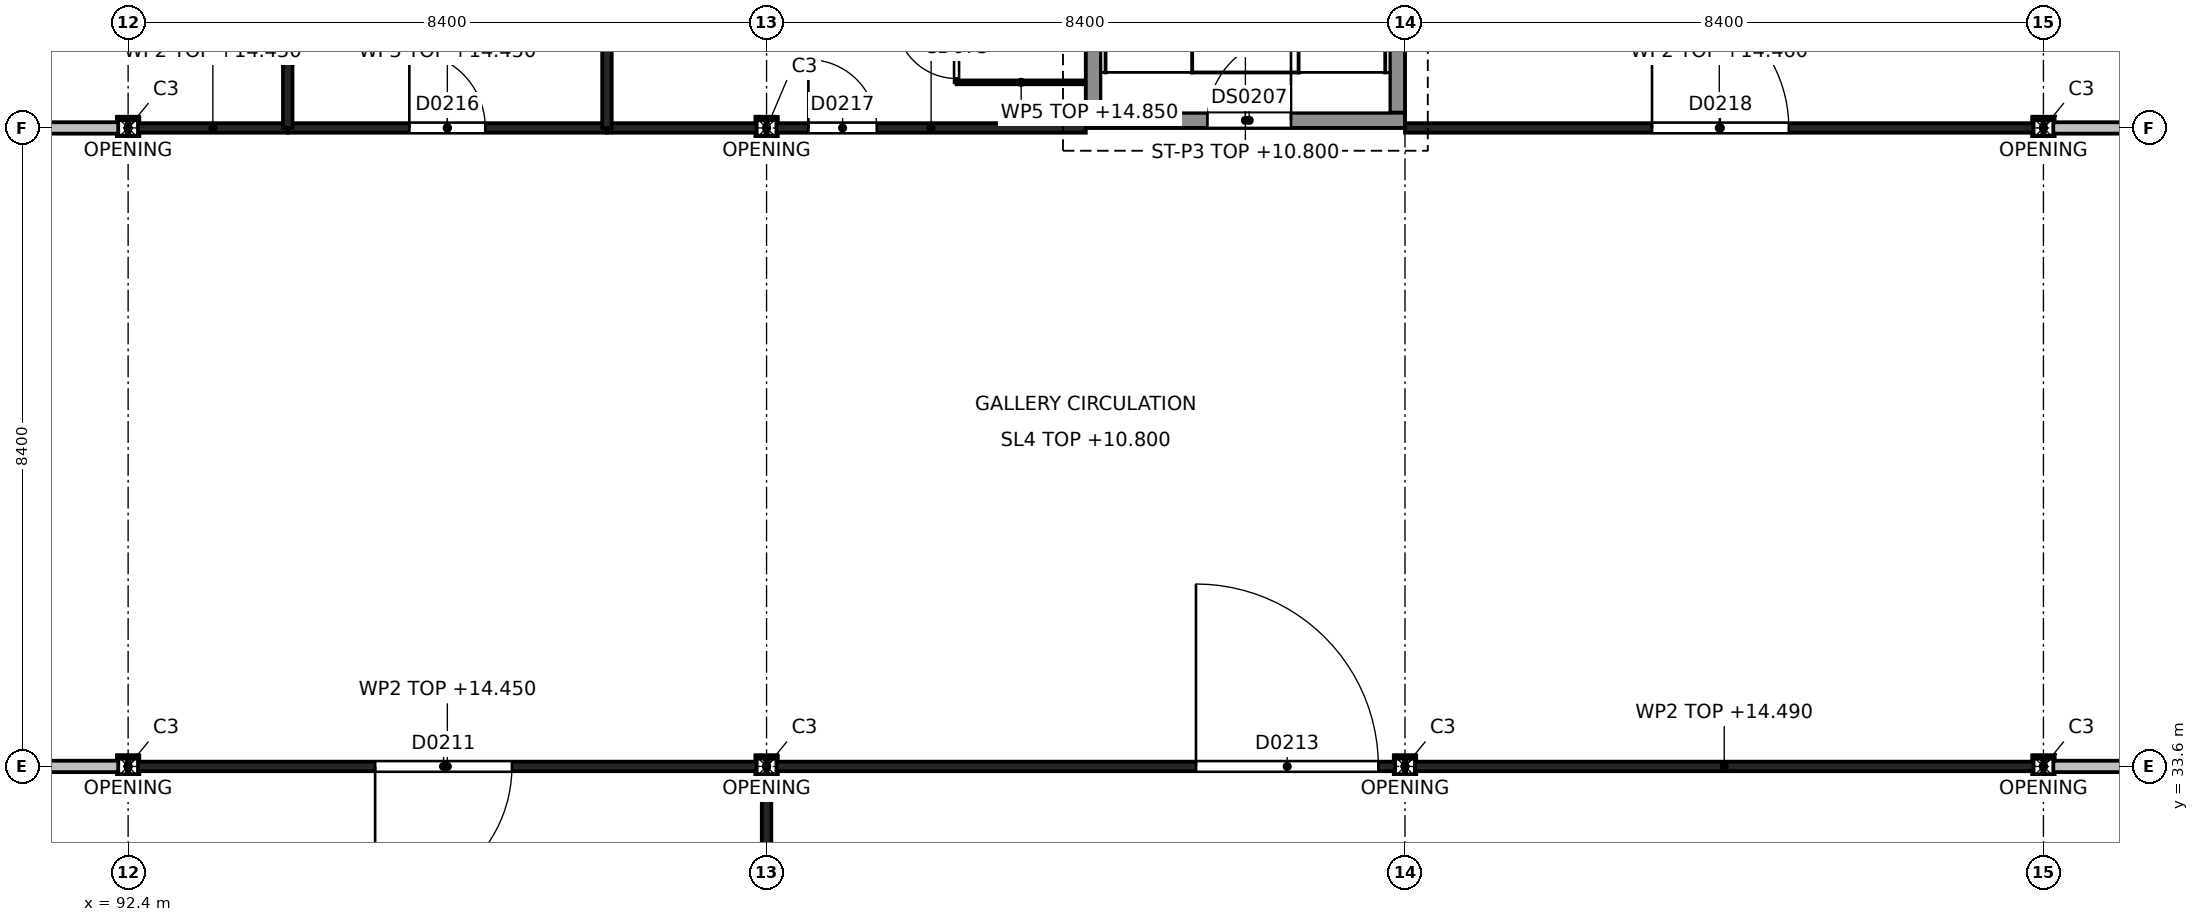
"""IFC4 building model, lengths in metres.
Left out: names, types, materials, properties, quantities, classifications, styles, units other than length and angle.
Written with IfcOpenShell. Run it as: python <this file> out.ifc"""

import sys

from ifc_helpers import new_model, si_unit, direction, frame, frame_2d, origin, origin_2d, place, context, subcontext, project, spatial, rectangle, i_section, extrude, element, fill, save


model = new_model("IFC4")
c1 = context("Model", 3, precision=1e-05, world=origin(), true_north=direction((0.0, 1.0)))
c2 = subcontext(c1, "Body", "Model", "MODEL_VIEW")
j1 = project(units=[si_unit("LENGTHUNIT", "METRE"), si_unit("PLANEANGLEUNIT", "RADIAN")], contexts=[c1])
p1 = place(None, origin())
s1 = spatial("IfcSite", under=j1, at=p1, CompositionType="ELEMENT")
p2 = place(p1, origin())
s2 = spatial("IfcBuilding", under=s1, at=p2, CompositionType="ELEMENT")
p3 = place(p2, frame((0.0, 0.0, 10.8)))
s3 = spatial("IfcBuildingStorey", under=s2, at=p3, CompositionType="ELEMENT", Elevation=10.8)
for number, where, z_axis, x_axis in (
    (1, (92.4, 33.6, 0.0), (0.0, 0.0, 1.0), (1.0, 0.0, 0.0)),
    (2, (92.4, 42.0, 0.0), (0.0, 0.0, 1.0), (1.0, 0.0, 0.0)),
    (3, (100.8, 33.6, 0.0), (0.0, 0.0, 1.0), (1.0, 0.0, 0.0)),
    (4, (100.8, 42.0, 0.0), (0.0, 0.0, 1.0), (1.0, 0.0, 0.0)),
    (5, (109.2, 33.6, 0.0), (0.0, 0.0, 1.0), (1.0, 0.0, 0.0)),
    (6, (117.6, 33.6, 0.0), (0.0, 0.0, 1.0), (1.0, 0.0, 0.0)),
    (7, (117.6, 42.0, 0.0), (0.0, 0.0, 1.0), (1.0, 0.0, 0.0)),
):
    element("IfcColumn", number, at=place(p3, frame(where, z_axis=z_axis, x_axis=x_axis)), inside=s3, PredefinedType="COLUMN", context=c2, shape_type="SweptSolid", body=[
        extrude(i_section(OverallWidth=0.26, OverallDepth=0.26, WebThickness=0.01, FlangeThickness=0.018, at=origin_2d()), origin(), (0.0, 0.0, 1.0), 4.2),
    ])
p4 = place(p3, frame((105.0, 42.1, 0.0), z_axis=(0.0, 0.0, 1.0), x_axis=(1.0, 0.0, 0.0)))
e8 = element("IfcWall", 8, at=p4, inside=s3, PredefinedType="SHEAR", context=c2, shape_type="SweptSolid", body=[
    extrude(rectangle(XDim=4.2, YDim=0.2, at=frame_2d((2.1, 0.0))), origin(), (0.0, 0.0, 1.0), 4.2),
])
p5 = place(p4, frame((1.6, 0.0, 0.0)))
e9 = element("IfcOpeningElement", 9, at=p5, cuts=e8, PredefinedType="OPENING", context=c2, shape_type="SweptSolid", body=[
    extrude(rectangle(XDim=1.1, YDim=2.1, at=frame_2d((0.55, 1.05))), frame((0.0, 0.1, 0.0), z_axis=(0.0, -1.0, 0.0), x_axis=(1.0, 0.0, 0.0)), (0.0, 0.0, 1.0), 0.2),
])
for number, where, z_axis, x_axis in (
    (10, (105.1, 42.2, 0.0), (0.0, 0.0, 1.0), (0.0, 1.0, 0.0)),
    (11, (109.1, 42.2, 0.0), (0.0, 0.0, 1.0), (0.0, 1.0, 0.0)),
):
    element("IfcWall", number, at=place(p3, frame(where, z_axis=z_axis, x_axis=x_axis)), inside=s3, PredefinedType="SHEAR", context=c2, shape_type="SweptSolid", body=[
        extrude(rectangle(XDim=8.0, YDim=0.2, at=frame_2d((4.0, 0.0))), origin(), (0.0, 0.0, 1.0), 4.2),
    ])
p6 = place(p3, frame((100.8, 25.33, 0.0), z_axis=(0.0, 0.0, 1.0), x_axis=(0.0, 1.0, 0.0)))
e12 = element("IfcWall", 12, at=p6, inside=s3, PredefinedType="PARTITIONING", context=c2, shape_type="SweptSolid", body=[
    extrude(rectangle(XDim=8.14, YDim=0.125, at=frame_2d((4.07, 0.0))), origin(), (0.0, 0.0, 1.0), 3.6),
])
p7 = place(p3, frame((84.13, 33.6, 0.0), z_axis=(0.0, 0.0, 1.0), x_axis=(1.0, 0.0, 0.0)))
e13 = element("IfcWall", 13, at=p7, inside=s3, PredefinedType="PARTITIONING", context=c2, shape_type="SweptSolid", body=[
    extrude(rectangle(XDim=8.14, YDim=0.15, at=frame_2d((4.07, 0.0))), origin(), (0.0, 0.0, 1.0), 3.65),
])
p8 = place(p7, frame((0.27, 0.0, 0.0)))
e14 = element("IfcOpeningElement", 14, at=p8, cuts=e13, PredefinedType="OPENING", context=c2, shape_type="SweptSolid", body=[
    extrude(rectangle(XDim=1.8, YDim=2.1, at=frame_2d((0.9, 1.05))), frame((0.0, 0.075, 0.0), z_axis=(0.0, -1.0, 0.0), x_axis=(1.0, 0.0, 0.0)), (0.0, 0.0, 1.0), 0.15),
])
p9 = place(p3, frame((92.53, 33.6, 0.0), z_axis=(0.0, 0.0, 1.0), x_axis=(1.0, 0.0, 0.0)))
e15 = element("IfcWall", 15, at=p9, inside=s3, PredefinedType="PARTITIONING", context=c2, shape_type="SweptSolid", body=[
    extrude(rectangle(XDim=8.14, YDim=0.125, at=frame_2d((4.07, 0.0))), origin(), (0.0, 0.0, 1.0), 3.65),
])
p10 = place(p9, frame((3.12, 0.0, 0.0)))
e16 = element("IfcOpeningElement", 16, at=p10, cuts=e15, PredefinedType="OPENING", context=c2, shape_type="SweptSolid", body=[
    extrude(rectangle(XDim=1.8, YDim=2.1, at=frame_2d((0.9, 1.05))), frame((0.0, 0.062, 0.0), z_axis=(0.0, -1.0, 0.0), x_axis=(1.0, 0.0, 0.0)), (0.0, 0.0, 1.0), 0.125),
])
p11 = place(p3, frame((100.93, 33.6, 0.0), z_axis=(0.0, 0.0, 1.0), x_axis=(1.0, 0.0, 0.0)))
e17 = element("IfcWall", 17, at=p11, inside=s3, PredefinedType="PARTITIONING", context=c2, shape_type="SweptSolid", body=[
    extrude(rectangle(XDim=8.14, YDim=0.125, at=frame_2d((4.07, 0.0))), origin(), (0.0, 0.0, 1.0), 3.65),
])
p12 = place(p11, frame((5.52, 0.0, 0.0)))
e18 = element("IfcOpeningElement", 18, at=p12, cuts=e17, PredefinedType="OPENING", context=c2, shape_type="SweptSolid", body=[
    extrude(rectangle(XDim=2.4, YDim=2.4, at=frame_2d((1.2, 1.2))), frame((0.0, 0.062, 0.0), z_axis=(0.0, -1.0, 0.0), x_axis=(1.0, 0.0, 0.0)), (0.0, 0.0, 1.0), 0.125),
])
p13 = place(p3, frame((109.33, 33.6, 0.0), z_axis=(0.0, 0.0, 1.0), x_axis=(1.0, 0.0, 0.0)))
e19 = element("IfcWall", 19, at=p13, inside=s3, PredefinedType="PARTITIONING", context=c2, shape_type="SweptSolid", body=[
    extrude(rectangle(XDim=8.14, YDim=0.125, at=frame_2d((4.07, 0.0))), origin(), (0.0, 0.0, 1.0), 3.69),
])
p14 = place(p3, frame((117.73, 33.6, 0.0), z_axis=(0.0, 0.0, 1.0), x_axis=(1.0, 0.0, 0.0)))
e20 = element("IfcWall", 20, at=p14, inside=s3, PredefinedType="PARTITIONING", context=c2, shape_type="SweptSolid", body=[
    extrude(rectangle(XDim=8.14, YDim=0.15, at=frame_2d((4.07, 0.0))), origin(), (0.0, 0.0, 1.0), 3.69),
])
p15 = place(p14, frame((5.52, 0.0, 0.0)))
e21 = element("IfcOpeningElement", 21, at=p15, cuts=e20, PredefinedType="OPENING", context=c2, shape_type="SweptSolid", body=[
    extrude(rectangle(XDim=2.4, YDim=2.4, at=frame_2d((1.2, 1.2))), frame((0.0, 0.075, 0.0), z_axis=(0.0, -1.0, 0.0), x_axis=(1.0, 0.0, 0.0)), (0.0, 0.0, 1.0), 0.15),
])
p16 = place(p3, frame((88.2, 42.0, 0.0), z_axis=(0.0, 0.0, 1.0), x_axis=(1.0, 0.0, 0.0)))
e22 = element("IfcWall", 22, at=p16, inside=s3, PredefinedType="PARTITIONING", context=c2, shape_type="SweptSolid", body=[
    extrude(rectangle(XDim=4.07, YDim=0.15, at=frame_2d((2.035, 0.0))), origin(), (0.0, 0.0, 1.0), 4.05),
])
p17 = place(p16, frame((1.15, 0.0, 0.0)))
e23 = element("IfcOpeningElement", 23, at=p17, cuts=e22, PredefinedType="OPENING", context=c2, shape_type="SweptSolid", body=[
    extrude(rectangle(XDim=1.8, YDim=2.1, at=frame_2d((0.9, 1.05))), frame((0.0, 0.075, 0.0), z_axis=(0.0, -1.0, 0.0), x_axis=(1.0, 0.0, 0.0)), (0.0, 0.0, 1.0), 0.15),
])
p18 = place(p3, frame((92.53, 42.0, 0.0), z_axis=(0.0, 0.0, 1.0), x_axis=(1.0, 0.0, 0.0)))
e24 = element("IfcWall", 24, at=p18, inside=s3, PredefinedType="PARTITIONING", context=c2, shape_type="SweptSolid", body=[
    extrude(rectangle(XDim=1.97, YDim=0.125, at=frame_2d((0.985, 0.0))), origin(), (0.0, 0.0, 1.0), 3.65),
])
p19 = place(p3, frame((94.5, 42.0, 0.0), z_axis=(0.0, 0.0, 1.0), x_axis=(1.0, 0.0, 0.0)))
e25 = element("IfcWall", 25, at=p19, inside=s3, PredefinedType="PARTITIONING", context=c2, shape_type="SweptSolid", body=[
    extrude(rectangle(XDim=4.2, YDim=0.125, at=frame_2d((2.1, 0.0))), origin(), (0.0, 0.0, 1.0), 3.65),
])
p20 = place(p19, frame((1.6, 0.0, 0.0)))
e26 = element("IfcOpeningElement", 26, at=p20, cuts=e25, PredefinedType="OPENING", context=c2, shape_type="SweptSolid", body=[
    extrude(rectangle(XDim=1.0, YDim=2.1, at=frame_2d((0.5, 1.05))), frame((0.0, 0.062, 0.0), z_axis=(0.0, -1.0, 0.0), x_axis=(1.0, 0.0, 0.0)), (0.0, 0.0, 1.0), 0.125),
])
p21 = place(p3, frame((98.7, 42.0, 0.0), z_axis=(0.0, 0.0, 1.0), x_axis=(1.0, 0.0, 0.0)))
e27 = element("IfcWall", 27, at=p21, inside=s3, PredefinedType="PARTITIONING", context=c2, shape_type="SweptSolid", body=[
    extrude(rectangle(XDim=1.97, YDim=0.125, at=frame_2d((0.985, 0.0))), origin(), (0.0, 0.0, 1.0), 3.65),
])
p22 = place(p3, frame((100.93, 42.0, 0.0), z_axis=(0.0, 0.0, 1.0), x_axis=(1.0, 0.0, 0.0)))
e28 = element("IfcWall", 28, at=p22, inside=s3, PredefinedType="PARTITIONING", context=c2, shape_type="SweptSolid", body=[
    extrude(rectangle(XDim=4.07, YDim=0.125, at=frame_2d((2.035, 0.0))), origin(), (0.0, 0.0, 1.0), 4.05),
])
p23 = place(p22, frame((0.42, 0.0, 0.0)))
e29 = element("IfcOpeningElement", 29, at=p23, cuts=e28, PredefinedType="OPENING", context=c2, shape_type="SweptSolid", body=[
    extrude(rectangle(XDim=0.9, YDim=2.1, at=frame_2d((0.45, 1.05))), frame((0.0, 0.062, 0.0), z_axis=(0.0, -1.0, 0.0), x_axis=(1.0, 0.0, 0.0)), (0.0, 0.0, 1.0), 0.125),
])
p24 = place(p3, frame((109.2, 42.0, 0.0), z_axis=(0.0, 0.0, 1.0), x_axis=(1.0, 0.0, 0.0)))
e30 = element("IfcWall", 30, at=p24, inside=s3, PredefinedType="PARTITIONING", context=c2, shape_type="SweptSolid", body=[
    extrude(rectangle(XDim=8.27, YDim=0.125, at=frame_2d((4.135, 0.0))), origin(), (0.0, 0.0, 1.0), 3.66),
])
p25 = place(p24, frame((3.25, 0.0, 0.0)))
e31 = element("IfcOpeningElement", 31, at=p25, cuts=e30, PredefinedType="OPENING", context=c2, shape_type="SweptSolid", body=[
    extrude(rectangle(XDim=1.8, YDim=2.1, at=frame_2d((0.9, 1.05))), frame((0.0, 0.062, 0.0), z_axis=(0.0, -1.0, 0.0), x_axis=(1.0, 0.0, 0.0)), (0.0, 0.0, 1.0), 0.125),
])
p26 = place(p3, frame((117.73, 42.0, 0.0), z_axis=(0.0, 0.0, 1.0), x_axis=(1.0, 0.0, 0.0)))
e32 = element("IfcWall", 32, at=p26, inside=s3, PredefinedType="PARTITIONING", context=c2, shape_type="SweptSolid", body=[
    extrude(rectangle(XDim=4.07, YDim=0.15, at=frame_2d((2.035, 0.0))), origin(), (0.0, 0.0, 1.0), 4.07),
])
for number, where, z_axis, x_axis in (
    (33, (94.5, 42.0, 0.0), (0.0, 0.0, 1.0), (0.0, 1.0, 0.0)),
    (34, (98.7, 42.0, 0.0), (0.0, 0.0, 1.0), (0.0, 1.0, 0.0)),
):
    element("IfcWall", number, at=place(p3, frame(where, z_axis=z_axis, x_axis=x_axis)), inside=s3, PredefinedType="PARTITIONING", context=c2, shape_type="SweptSolid", body=[
        extrude(rectangle(XDim=8.159, YDim=0.125, at=frame_2d((4.08, 0.0))), origin(), (0.0, 0.0, 1.0), 3.65),
    ])
p27 = place(p3, frame((103.3, 42.6, 0.0), z_axis=(0.0, 0.0, 1.0), x_axis=(0.0, 1.0, 0.0)))
e35 = element("IfcWall", 35, at=p27, inside=s3, PredefinedType="PARTITIONING", context=c2, shape_type="SweptSolid", body=[
    extrude(rectangle(XDim=7.2, YDim=0.05, at=frame_2d((3.6, 0.0))), origin(), (0.0, 0.0, 1.0), 4.05),
])
p28 = place(p27, frame((0.05, 0.0, 0.0)))
e36 = element("IfcOpeningElement", 36, at=p28, cuts=e35, PredefinedType="OPENING", context=c2, shape_type="SweptSolid", body=[
    extrude(rectangle(XDim=0.8, YDim=2.0, at=frame_2d((0.4, 1.0))), frame((0.0, 0.025, 0.0), z_axis=(0.0, -1.0, 0.0), x_axis=(1.0, 0.0, 0.0)), (0.0, 0.0, 1.0), 0.05),
])
p29 = place(p27, frame((0.95, 0.0, 0.0)))
e37 = element("IfcOpeningElement", 37, at=p29, cuts=e35, PredefinedType="OPENING", context=c2, shape_type="SweptSolid", body=[
    extrude(rectangle(XDim=0.8, YDim=2.0, at=frame_2d((0.4, 1.0))), frame((0.0, 0.025, 0.0), z_axis=(0.0, -1.0, 0.0), x_axis=(1.0, 0.0, 0.0)), (0.0, 0.0, 1.0), 0.05),
])
p30 = place(p27, frame((1.85, 0.0, 0.0)))
e38 = element("IfcOpeningElement", 38, at=p30, cuts=e35, PredefinedType="OPENING", context=c2, shape_type="SweptSolid", body=[
    extrude(rectangle(XDim=0.8, YDim=2.0, at=frame_2d((0.4, 1.0))), frame((0.0, 0.025, 0.0), z_axis=(0.0, -1.0, 0.0), x_axis=(1.0, 0.0, 0.0)), (0.0, 0.0, 1.0), 0.05),
])
p31 = place(p27, frame((2.75, 0.0, 0.0)))
e39 = element("IfcOpeningElement", 39, at=p31, cuts=e35, PredefinedType="OPENING", context=c2, shape_type="SweptSolid", body=[
    extrude(rectangle(XDim=0.8, YDim=2.0, at=frame_2d((0.4, 1.0))), frame((0.0, 0.025, 0.0), z_axis=(0.0, -1.0, 0.0), x_axis=(1.0, 0.0, 0.0)), (0.0, 0.0, 1.0), 0.05),
])
p32 = place(p27, frame((3.65, 0.0, 0.0)))
e40 = element("IfcOpeningElement", 40, at=p32, cuts=e35, PredefinedType="OPENING", context=c2, shape_type="SweptSolid", body=[
    extrude(rectangle(XDim=0.8, YDim=2.0, at=frame_2d((0.4, 1.0))), frame((0.0, 0.025, 0.0), z_axis=(0.0, -1.0, 0.0), x_axis=(1.0, 0.0, 0.0)), (0.0, 0.0, 1.0), 0.05),
])
p33 = place(p27, frame((4.55, 0.0, 0.0)))
e41 = element("IfcOpeningElement", 41, at=p33, cuts=e35, PredefinedType="OPENING", context=c2, shape_type="SweptSolid", body=[
    extrude(rectangle(XDim=0.8, YDim=2.0, at=frame_2d((0.4, 1.0))), frame((0.0, 0.025, 0.0), z_axis=(0.0, -1.0, 0.0), x_axis=(1.0, 0.0, 0.0)), (0.0, 0.0, 1.0), 0.05),
])
p34 = place(p27, frame((5.45, 0.0, 0.0)))
e42 = element("IfcOpeningElement", 42, at=p34, cuts=e35, PredefinedType="OPENING", context=c2, shape_type="SweptSolid", body=[
    extrude(rectangle(XDim=0.8, YDim=2.0, at=frame_2d((0.4, 1.0))), frame((0.0, 0.025, 0.0), z_axis=(0.0, -1.0, 0.0), x_axis=(1.0, 0.0, 0.0)), (0.0, 0.0, 1.0), 0.05),
])
p35 = place(p27, frame((6.35, 0.0, 0.0)))
e43 = element("IfcOpeningElement", 43, at=p35, cuts=e35, PredefinedType="OPENING", context=c2, shape_type="SweptSolid", body=[
    extrude(rectangle(XDim=0.8, YDim=2.0, at=frame_2d((0.4, 1.0))), frame((0.0, 0.025, 0.0), z_axis=(0.0, -1.0, 0.0), x_axis=(1.0, 0.0, 0.0)), (0.0, 0.0, 1.0), 0.05),
])
p36 = place(p3, frame((105.0, 42.6, 0.0), z_axis=(0.0, 0.0, 1.0), x_axis=(-1.0, 0.0, 0.0)))
e44 = element("IfcWall", 44, at=p36, inside=s3, PredefinedType="PARTITIONING", context=c2, shape_type="SweptSolid", body=[
    extrude(rectangle(XDim=1.7, YDim=0.05, at=frame_2d((0.85, 0.0))), origin(), (0.0, 0.0, 1.0), 4.05),
])
p37 = place(p10, origin())
e45 = element("IfcDoor", 45, at=p37, inside=s3, OperationType="DOUBLE_DOOR_DOUBLE_SWING", PredefinedType="DOOR", context=c2, shape_type="SweptSolid", body=[
    extrude(rectangle(XDim=1.8, YDim=2.1, at=frame_2d((0.9, 1.05))), frame((0.0, 0.025, 0.0), z_axis=(0.0, -1.0, 0.0), x_axis=(1.0, 0.0, 0.0)), (0.0, 0.0, 1.0), 0.05),
])
fill(e16, e45)
p38 = place(p12, origin())
e46 = element("IfcDoor", 46, at=p38, inside=s3, OperationType="DOUBLE_DOOR_DOUBLE_SWING", PredefinedType="DOOR", context=c2, shape_type="SweptSolid", body=[
    extrude(rectangle(XDim=2.4, YDim=2.4, at=frame_2d((1.2, 1.2))), frame((0.0, 0.025, 0.0), z_axis=(0.0, -1.0, 0.0), x_axis=(1.0, 0.0, 0.0)), (0.0, 0.0, 1.0), 0.05),
])
fill(e18, e46)
p39 = place(p20, origin())
e47 = element("IfcDoor", 47, at=p39, inside=s3, OperationType="SINGLE_SWING_LEFT", PredefinedType="DOOR", context=c2, shape_type="SweptSolid", body=[
    extrude(rectangle(XDim=1.0, YDim=2.1, at=frame_2d((0.5, 1.05))), frame((0.0, 0.025, 0.0), z_axis=(0.0, -1.0, 0.0), x_axis=(1.0, 0.0, 0.0)), (0.0, 0.0, 1.0), 0.05),
])
fill(e26, e47)
p40 = place(p23, origin())
e48 = element("IfcDoor", 48, at=p40, inside=s3, OperationType="SINGLE_SWING_LEFT", PredefinedType="DOOR", context=c2, shape_type="SweptSolid", body=[
    extrude(rectangle(XDim=0.9, YDim=2.1, at=frame_2d((0.45, 1.05))), frame((0.0, 0.025, 0.0), z_axis=(0.0, -1.0, 0.0), x_axis=(1.0, 0.0, 0.0)), (0.0, 0.0, 1.0), 0.05),
])
fill(e29, e48)
p41 = place(p25, origin())
e49 = element("IfcDoor", 49, at=p41, inside=s3, OperationType="DOUBLE_DOOR_DOUBLE_SWING", PredefinedType="DOOR", context=c2, shape_type="SweptSolid", body=[
    extrude(rectangle(XDim=1.8, YDim=2.1, at=frame_2d((0.9, 1.05))), frame((0.0, 0.025, 0.0), z_axis=(0.0, -1.0, 0.0), x_axis=(1.0, 0.0, 0.0)), (0.0, 0.0, 1.0), 0.05),
])
fill(e31, e49)
p42 = place(p5, origin())
e50 = element("IfcDoor", 50, at=p42, inside=s3, OperationType="SINGLE_SWING_RIGHT", PredefinedType="DOOR", context=c2, shape_type="SweptSolid", body=[
    extrude(rectangle(XDim=1.1, YDim=2.1, at=frame_2d((0.55, 1.05))), frame((0.0, 0.025, 0.0), z_axis=(0.0, -1.0, 0.0), x_axis=(1.0, 0.0, 0.0)), (0.0, 0.0, 1.0), 0.05),
])
fill(e9, e50)
p43 = place(p28, origin())
e51 = element("IfcDoor", 51, at=p43, inside=s3, OperationType="SINGLE_SWING_RIGHT", PredefinedType="DOOR", context=c2, shape_type="SweptSolid", body=[
    extrude(rectangle(XDim=0.8, YDim=2.0, at=frame_2d((0.4, 1.0))), frame((0.0, 0.025, 0.0), z_axis=(0.0, -1.0, 0.0), x_axis=(1.0, 0.0, 0.0)), (0.0, 0.0, 1.0), 0.05),
])
fill(e36, e51)
save(model, sys.argv[1])
